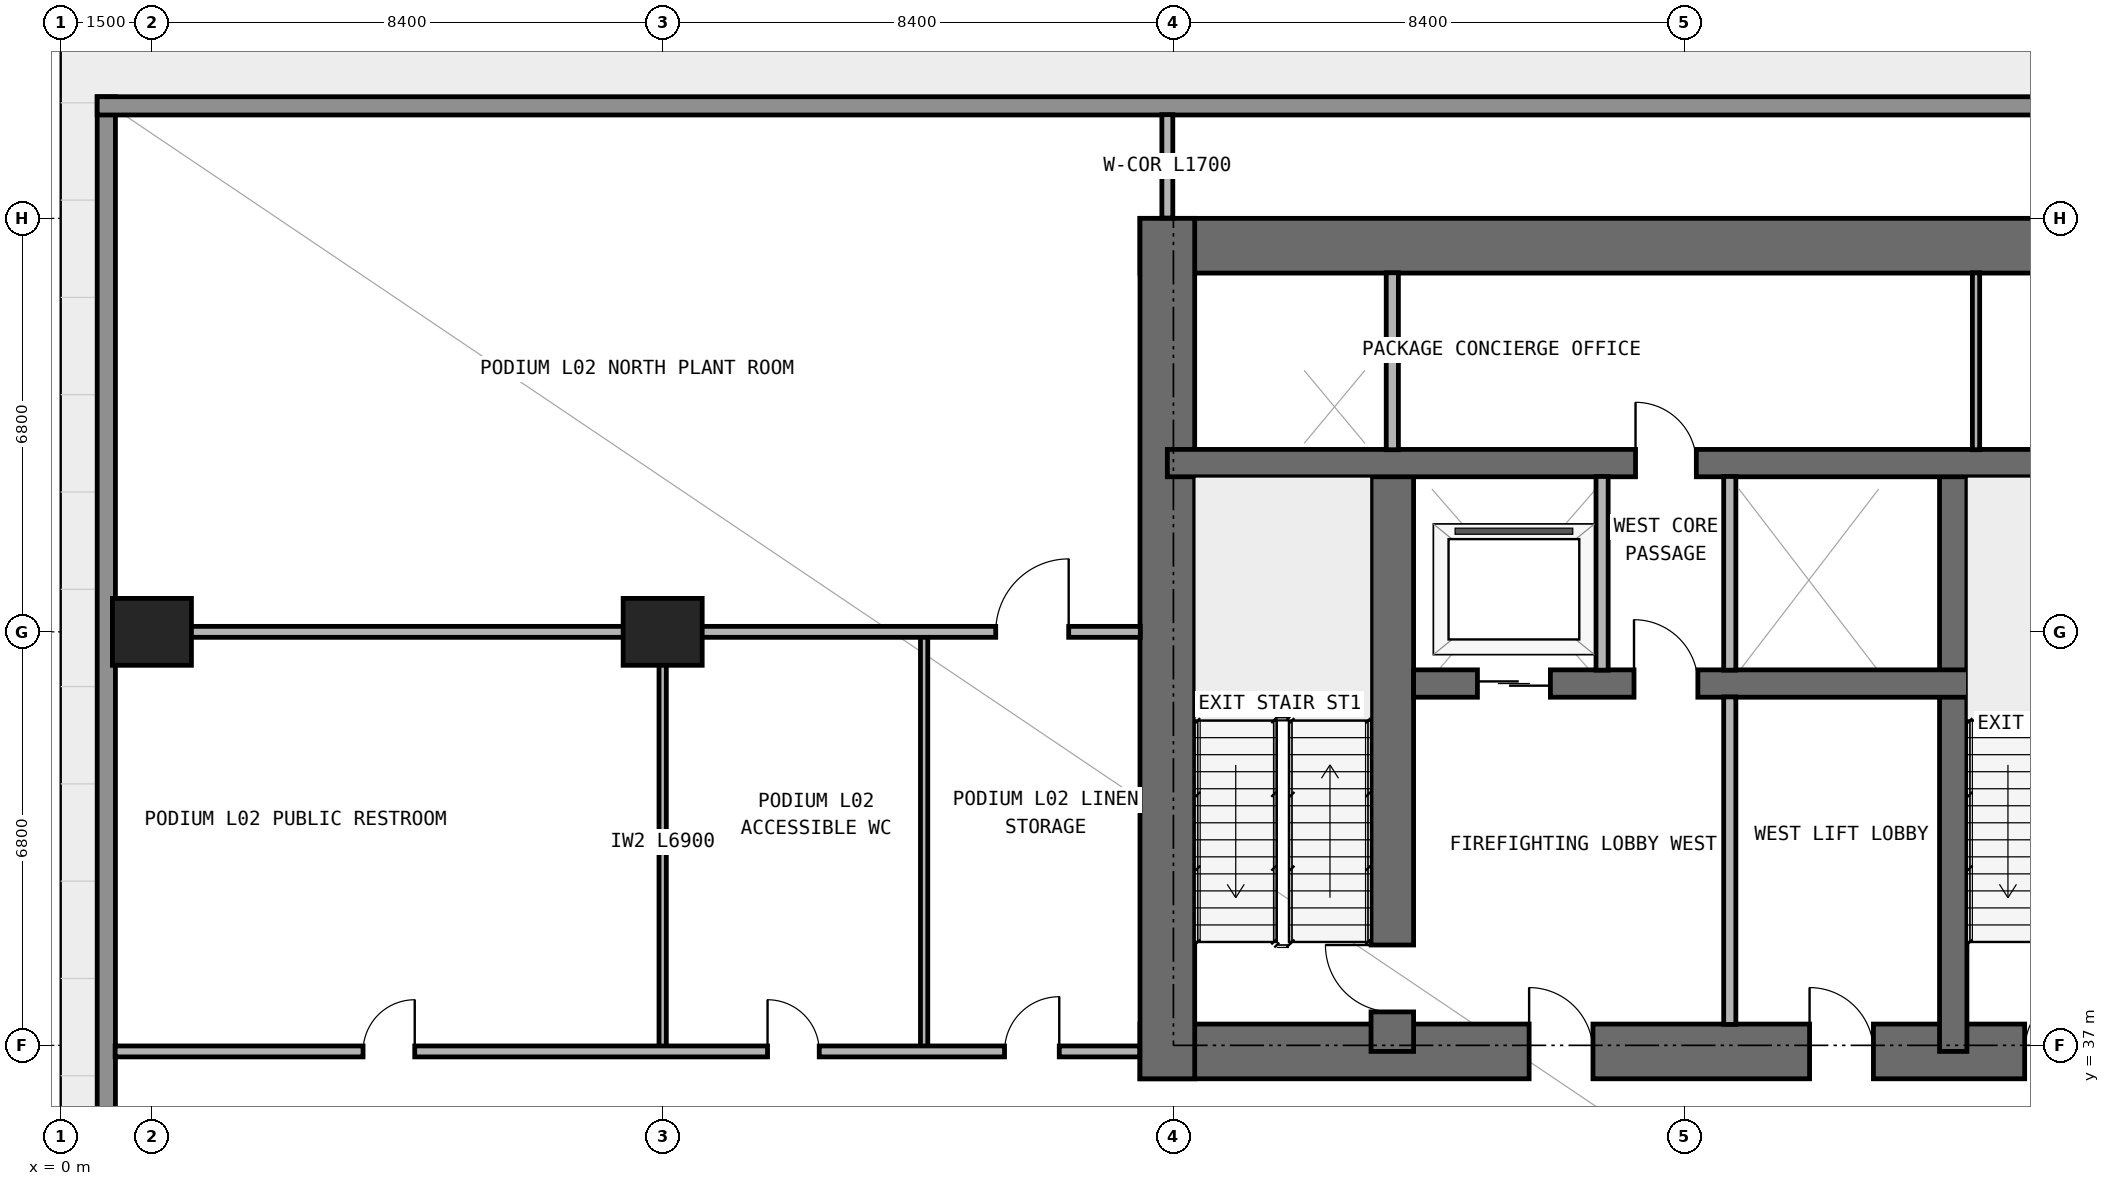
"""IFC4 building model, lengths in metres.
Left out: names, types, materials, properties, quantities, classifications, styles, units other than length and angle.
Written with IfcOpenShell. Run it as: python <this file> out.ifc"""

import sys

from ifc_helpers import new_model, si_unit, direction, frame, frame_2d, origin, origin_2d, place, context, subcontext, project, spatial, rectangle, extrude, element, fill, save


model = new_model("IFC4")
c1 = context("Model", 3, precision=1e-05, world=origin(), true_north=direction((0.0, 1.0)))
c2 = subcontext(c1, "Body", "Model", "MODEL_VIEW")
j1 = project(units=[si_unit("LENGTHUNIT", "METRE"), si_unit("PLANEANGLEUNIT", "RADIAN")], contexts=[c1])
p1 = place(None, origin())
s1 = spatial("IfcSite", under=j1, at=p1, CompositionType="ELEMENT")
p2 = place(p1, origin())
s2 = spatial("IfcBuilding", under=s1, at=p2, CompositionType="ELEMENT")
p3 = place(p2, frame((0.0, 0.0, 10.2)))
s3 = spatial("IfcBuildingStorey", under=s2, at=p3, CompositionType="ELEMENT", Elevation=10.2)
for number, where, z_axis, x_axis in (
    (1, (1.5, 43.8, 0.0), (0.0, 0.0, 1.0), (1.0, 0.0, 0.0)),
    (2, (9.9, 43.8, 0.0), (0.0, 0.0, 1.0), (1.0, 0.0, 0.0)),
):
    element("IfcColumn", number, at=place(p3, frame(where, z_axis=z_axis, x_axis=x_axis)), inside=s3, PredefinedType="COLUMN", context=c2, shape_type="SweptSolid", body=[
        extrude(rectangle(XDim=1.3, YDim=1.1, at=origin_2d()), origin(), (0.0, 0.0, 1.0), 4.5),
    ])
p4 = place(p3, frame((17.75, 36.9, 0.0), z_axis=(0.0, 0.0, 1.0), x_axis=(1.0, 0.0, 0.0)))
e3 = element("IfcWall", 3, at=p4, inside=s3, PredefinedType="SHEAR", context=c2, shape_type="SweptSolid", body=[
    extrude(rectangle(XDim=42.3, YDim=0.9, at=frame_2d((21.15, 0.0))), origin(), (0.0, 0.0, 1.0), 4.5),
])
p5 = place(p4, frame((14.55, 0.0, 0.0)))
e4 = element("IfcOpeningElement", 4, at=p5, cuts=e3, PredefinedType="OPENING", context=c2, shape_type="SweptSolid", body=[
    extrude(rectangle(XDim=1.1, YDim=2.15, at=frame_2d((0.55, 1.075))), frame((0.0, 0.46, 0.0), z_axis=(0.0, -1.0, 0.0), x_axis=(1.0, 0.0, 0.0)), (0.0, 0.0, 1.0), 0.92),
])
p6 = place(p4, frame((6.4, 0.0, 0.0)))
e5 = element("IfcOpeningElement", 5, at=p6, cuts=e3, PredefinedType="OPENING", context=c2, shape_type="SweptSolid", body=[
    extrude(rectangle(XDim=1.05, YDim=2.15, at=frame_2d((0.525, 1.075))), frame((0.0, 0.46, 0.0), z_axis=(0.0, -1.0, 0.0), x_axis=(1.0, 0.0, 0.0)), (0.0, 0.0, 1.0), 0.92),
])
p7 = place(p4, frame((34.9, 0.0, 0.0)))
e6 = element("IfcOpeningElement", 6, at=p7, cuts=e3, PredefinedType="OPENING", context=c2, shape_type="SweptSolid", body=[
    extrude(rectangle(XDim=1.05, YDim=2.15, at=frame_2d((0.525, 1.075))), frame((0.0, 0.46, 0.0), z_axis=(0.0, -1.0, 0.0), x_axis=(1.0, 0.0, 0.0)), (0.0, 0.0, 1.0), 0.92),
])
p8 = place(p4, frame((11.012, 0.0, 0.0)))
e7 = element("IfcOpeningElement", 7, at=p8, cuts=e3, PredefinedType="OPENING", context=c2, shape_type="SweptSolid", body=[
    extrude(rectangle(XDim=1.05, YDim=2.15, at=frame_2d((0.525, 1.075))), frame((0.0, 0.46, 0.0), z_axis=(0.0, -1.0, 0.0), x_axis=(1.0, 0.0, 0.0)), (0.0, 0.0, 1.0), 0.92),
])
p9 = place(p4, frame((24.25, 0.0, 0.0)))
e8 = element("IfcOpeningElement", 8, at=p9, cuts=e3, PredefinedType="OPENING", context=c2, shape_type="SweptSolid", body=[
    extrude(rectangle(XDim=1.05, YDim=2.15, at=frame_2d((0.525, 1.075))), frame((0.0, 0.46, 0.0), z_axis=(0.0, -1.0, 0.0), x_axis=(1.0, 0.0, 0.0)), (0.0, 0.0, 1.0), 0.92),
])
p10 = place(p3, frame((17.75, 50.15, 0.0), z_axis=(0.0, 0.0, 1.0), x_axis=(1.0, 0.0, 0.0)))
e9 = element("IfcWall", 9, at=p10, inside=s3, PredefinedType="SHEAR", context=c2, shape_type="SweptSolid", body=[
    extrude(rectangle(XDim=42.3, YDim=0.9, at=frame_2d((21.15, 0.0))), origin(), (0.0, 0.0, 1.0), 4.5),
])
p11 = place(p3, frame((18.2, 36.45, 0.0), z_axis=(0.0, 0.0, 1.0), x_axis=(0.0, 1.0, 0.0)))
e10 = element("IfcWall", 10, at=p11, inside=s3, PredefinedType="SHEAR", context=c2, shape_type="SweptSolid", body=[
    extrude(rectangle(XDim=14.15, YDim=0.9, at=frame_2d((7.075, 0.0))), origin(), (0.0, 0.0, 1.0), 4.5),
])
p12 = place(p3, frame((21.9, 36.9, 0.0), z_axis=(0.0, 0.0, 1.0), x_axis=(0.0, 1.0, 0.0)))
e11 = element("IfcWall", 11, at=p12, inside=s3, PredefinedType="SHEAR", context=c2, shape_type="SweptSolid", body=[
    extrude(rectangle(XDim=9.675, YDim=0.7, at=frame_2d((4.837, 0.0))), origin(), (0.0, 0.0, 1.0), 4.5),
])
p13 = place(p12, frame((0.65, 0.0, 0.0)))
e12 = element("IfcOpeningElement", 12, at=p13, cuts=e11, PredefinedType="OPENING", context=c2, shape_type="SweptSolid", body=[
    extrude(rectangle(XDim=1.1, YDim=2.15, at=frame_2d((0.55, 1.075))), frame((0.0, 0.36, 0.0), z_axis=(0.0, -1.0, 0.0), x_axis=(1.0, 0.0, 0.0)), (0.0, 0.0, 1.0), 0.72),
])
p14 = place(p3, frame((31.125, 36.9, 0.0), z_axis=(0.0, 0.0, 1.0), x_axis=(0.0, 1.0, 0.0)))
e13 = element("IfcWall", 13, at=p14, inside=s3, PredefinedType="SHEAR", context=c2, shape_type="SweptSolid", body=[
    extrude(rectangle(XDim=9.675, YDim=0.45, at=frame_2d((4.837, 0.0))), origin(), (0.0, 0.0, 1.0), 4.5),
])
p15 = place(p3, frame((22.25, 42.95, 0.0), z_axis=(0.0, 0.0, 1.0), x_axis=(1.0, 0.0, 0.0)))
e14 = element("IfcWall", 14, at=p15, inside=s3, PredefinedType="SHEAR", context=c2, shape_type="SweptSolid", body=[
    extrude(rectangle(XDim=33.3, YDim=0.45, at=frame_2d((16.65, 0.0))), origin(), (0.0, 0.0, 1.0), 4.5),
])
p16 = place(p15, frame((1.05, 0.0, 0.0)))
e15 = element("IfcOpeningElement", 15, at=p16, cuts=e14, PredefinedType="OPENING", context=c2, shape_type="SweptSolid", body=[
    extrude(rectangle(XDim=1.2, YDim=2.2, at=frame_2d((0.6, 1.1))), frame((0.0, 0.235, 0.0), z_axis=(0.0, -1.0, 0.0), x_axis=(1.0, 0.0, 0.0)), (0.0, 0.0, 1.0), 0.47),
])
p17 = place(p15, frame((31.05, 0.0, 0.0)))
e16 = element("IfcOpeningElement", 16, at=p17, cuts=e14, PredefinedType="OPENING", context=c2, shape_type="SweptSolid", body=[
    extrude(rectangle(XDim=1.2, YDim=2.2, at=frame_2d((0.6, 1.1))), frame((0.0, 0.235, 0.0), z_axis=(0.0, -1.0, 0.0), x_axis=(1.0, 0.0, 0.0)), (0.0, 0.0, 1.0), 0.47),
])
p18 = place(p15, frame((13.5, 0.0, 0.0)))
e17 = element("IfcOpeningElement", 17, at=p18, cuts=e14, PredefinedType="OPENING", context=c2, shape_type="SweptSolid", body=[
    extrude(rectangle(XDim=1.1, YDim=2.2, at=frame_2d((0.55, 1.1))), frame((0.0, 0.235, 0.0), z_axis=(0.0, -1.0, 0.0), x_axis=(1.0, 0.0, 0.0)), (0.0, 0.0, 1.0), 0.47),
])
p19 = place(p15, frame((16.1, 0.0, 0.0)))
e18 = element("IfcOpeningElement", 18, at=p19, cuts=e14, PredefinedType="OPENING", context=c2, shape_type="SweptSolid", body=[
    extrude(rectangle(XDim=1.1, YDim=2.2, at=frame_2d((0.55, 1.1))), frame((0.0, 0.235, 0.0), z_axis=(0.0, -1.0, 0.0), x_axis=(1.0, 0.0, 0.0)), (0.0, 0.0, 1.0), 0.47),
])
p20 = place(p15, frame((18.7, 0.0, 0.0)))
e19 = element("IfcOpeningElement", 19, at=p20, cuts=e14, PredefinedType="OPENING", context=c2, shape_type="SweptSolid", body=[
    extrude(rectangle(XDim=1.1, YDim=2.2, at=frame_2d((0.55, 1.1))), frame((0.0, 0.235, 0.0), z_axis=(0.0, -1.0, 0.0), x_axis=(1.0, 0.0, 0.0)), (0.0, 0.0, 1.0), 0.47),
])
p21 = place(p15, frame((3.625, 0.0, 0.0)))
e20 = element("IfcOpeningElement", 20, at=p21, cuts=e14, PredefinedType="OPENING", context=c2, shape_type="SweptSolid", body=[
    extrude(rectangle(XDim=1.05, YDim=2.15, at=frame_2d((0.525, 1.075))), frame((0.0, 0.235, 0.0), z_axis=(0.0, -1.0, 0.0), x_axis=(1.0, 0.0, 0.0)), (0.0, 0.0, 1.0), 0.47),
])
p22 = place(p15, frame((28.675, 0.0, 0.0)))
e21 = element("IfcOpeningElement", 21, at=p22, cuts=e14, PredefinedType="OPENING", context=c2, shape_type="SweptSolid", body=[
    extrude(rectangle(XDim=1.05, YDim=2.15, at=frame_2d((0.525, 1.075))), frame((0.0, 0.235, 0.0), z_axis=(0.0, -1.0, 0.0), x_axis=(1.0, 0.0, 0.0)), (0.0, 0.0, 1.0), 0.47),
])
p23 = place(p3, frame((18.2, 46.575, 0.0), z_axis=(0.0, 0.0, 1.0), x_axis=(1.0, 0.0, 0.0)))
e22 = element("IfcWall", 22, at=p23, inside=s3, PredefinedType="SHEAR", context=c2, shape_type="SweptSolid", body=[
    extrude(rectangle(XDim=41.4, YDim=0.45, at=frame_2d((20.7, 0.0))), origin(), (0.0, 0.0, 1.0), 4.5),
])
p24 = place(p23, frame((7.7, 0.0, 0.0)))
e23 = element("IfcOpeningElement", 23, at=p24, cuts=e22, PredefinedType="OPENING", context=c2, shape_type="SweptSolid", body=[
    extrude(rectangle(XDim=1.0, YDim=2.2, at=frame_2d((0.5, 1.1))), frame((0.0, 0.235, 0.0), z_axis=(0.0, -1.0, 0.0), x_axis=(1.0, 0.0, 0.0)), (0.0, 0.0, 1.0), 0.47),
])
p25 = place(p23, frame((32.725, 0.0, 0.0)))
e24 = element("IfcOpeningElement", 24, at=p25, cuts=e22, PredefinedType="OPENING", context=c2, shape_type="SweptSolid", body=[
    extrude(rectangle(XDim=1.05, YDim=2.15, at=frame_2d((0.525, 1.075))), frame((0.0, 0.235, 0.0), z_axis=(0.0, -1.0, 0.0), x_axis=(1.0, 0.0, 0.0)), (0.0, 0.0, 1.0), 0.47),
])
p26 = place(p3, frame((0.75, 26.8, 0.0), z_axis=(0.0, 0.0, 1.0), x_axis=(0.0, 1.0, 0.0)))
e25 = element("IfcWall", 25, at=p26, inside=s3, PredefinedType="STANDARD", context=c2, shape_type="SweptSolid", body=[
    extrude(rectangle(XDim=25.8, YDim=0.3, at=frame_2d((12.9, 0.0))), origin(), (0.0, 0.0, 1.0), 4.5),
])
p27 = place(p3, frame((0.6, 52.45, 0.0), z_axis=(0.0, 0.0, 1.0), x_axis=(1.0, 0.0, 0.0)))
e26 = element("IfcWall", 26, at=p27, inside=s3, PredefinedType="STANDARD", context=c2, shape_type="SweptSolid", body=[
    extrude(rectangle(XDim=76.6, YDim=0.3, at=frame_2d((38.3, 0.0))), origin(), (0.0, 0.0, 1.0), 4.5),
])
p28 = place(p3, frame((9.9, 36.9, 0.0), z_axis=(0.0, 0.0, 1.0), x_axis=(0.0, 1.0, 0.0)))
e27 = element("IfcWall", 27, at=p28, inside=s3, PredefinedType="PARTITIONING", context=c2, shape_type="SweptSolid", body=[
    extrude(rectangle(XDim=6.9, YDim=0.12, at=frame_2d((3.45, 0.0))), origin(), (0.0, 0.0, 1.0), 3.464),
])
p29 = place(p3, frame((14.2, 36.9, 0.0), z_axis=(0.0, 0.0, 1.0), x_axis=(0.0, 1.0, 0.0)))
e28 = element("IfcWall", 28, at=p29, inside=s3, PredefinedType="PARTITIONING", context=c2, shape_type="SweptSolid", body=[
    extrude(rectangle(XDim=6.9, YDim=0.12, at=frame_2d((3.45, 0.0))), origin(), (0.0, 0.0, 1.0), 4.5),
])
p30 = place(p3, frame((18.2, 50.605, 0.0), z_axis=(0.0, 0.0, 1.0), x_axis=(0.0, 1.0, 0.0)))
e29 = element("IfcWall", 29, at=p30, inside=s3, PredefinedType="PARTITIONING", context=c2, shape_type="SweptSolid", body=[
    extrude(rectangle(XDim=1.7, YDim=0.18, at=frame_2d((0.85, 0.0))), origin(), (0.0, 0.0, 1.0), 4.5),
])
p31 = place(p3, frame((21.9, 46.795, 0.0), z_axis=(0.0, 0.0, 1.0), x_axis=(0.0, 1.0, 0.0)))
e30 = element("IfcWall", 30, at=p31, inside=s3, PredefinedType="PARTITIONING", context=c2, shape_type="SweptSolid", body=[
    extrude(rectangle(XDim=2.91, YDim=0.2, at=frame_2d((1.455, 0.0))), origin(), (0.0, 0.0, 1.0), 4.5),
])
p32 = place(p3, frame((25.35, 43.17, 0.0), z_axis=(0.0, 0.0, 1.0), x_axis=(0.0, 1.0, 0.0)))
e31 = element("IfcWall", 31, at=p32, inside=s3, PredefinedType="PARTITIONING", context=c2, shape_type="SweptSolid", body=[
    extrude(rectangle(XDim=3.185, YDim=0.2, at=frame_2d((1.593, 0.0))), origin(), (0.0, 0.0, 1.0), 4.5),
])
p33 = place(p3, frame((27.45, 37.345, 0.0), z_axis=(0.0, 0.0, 1.0), x_axis=(0.0, 1.0, 0.0)))
e32 = element("IfcWall", 32, at=p33, inside=s3, PredefinedType="PARTITIONING", context=c2, shape_type="SweptSolid", body=[
    extrude(rectangle(XDim=5.385, YDim=0.2, at=frame_2d((2.692, 0.0))), origin(), (0.0, 0.0, 1.0), 4.5),
])
p34 = place(p3, frame((27.45, 43.17, 0.0), z_axis=(0.0, 0.0, 1.0), x_axis=(0.0, 1.0, 0.0)))
e33 = element("IfcWall", 33, at=p34, inside=s3, PredefinedType="PARTITIONING", context=c2, shape_type="SweptSolid", body=[
    extrude(rectangle(XDim=3.185, YDim=0.2, at=frame_2d((1.593, 0.0))), origin(), (0.0, 0.0, 1.0), 4.5),
])
p35 = place(p3, frame((31.5, 46.795, 0.0), z_axis=(0.0, 0.0, 1.0), x_axis=(0.0, 1.0, 0.0)))
e34 = element("IfcWall", 34, at=p35, inside=s3, PredefinedType="PARTITIONING", context=c2, shape_type="SweptSolid", body=[
    extrude(rectangle(XDim=2.91, YDim=0.12, at=frame_2d((1.455, 0.0))), origin(), (0.0, 0.0, 1.0), 4.5),
])
p36 = place(p3, frame((0.895, 36.9, 0.0), z_axis=(0.0, 0.0, 1.0), x_axis=(1.0, 0.0, 0.0)))
e35 = element("IfcWall", 35, at=p36, inside=s3, PredefinedType="PARTITIONING", context=c2, shape_type="SweptSolid", body=[
    extrude(rectangle(XDim=16.85, YDim=0.18, at=frame_2d((8.425, 0.0))), origin(), (0.0, 0.0, 1.0), 4.5),
])
p37 = place(p36, frame((4.077, 0.0, 0.0)))
e36 = element("IfcOpeningElement", 36, at=p37, cuts=e35, PredefinedType="OPENING", context=c2, shape_type="SweptSolid", body=[
    extrude(rectangle(XDim=0.85, YDim=2.1, at=frame_2d((0.425, 1.05))), frame((0.0, 0.1, 0.0), z_axis=(0.0, -1.0, 0.0), x_axis=(1.0, 0.0, 0.0)), (0.0, 0.0, 1.0), 0.2),
])
p38 = place(p36, frame((10.73, 0.0, 0.0)))
e37 = element("IfcOpeningElement", 37, at=p38, cuts=e35, PredefinedType="OPENING", context=c2, shape_type="SweptSolid", body=[
    extrude(rectangle(XDim=0.85, YDim=2.1, at=frame_2d((0.425, 1.05))), frame((0.0, 0.1, 0.0), z_axis=(0.0, -1.0, 0.0), x_axis=(1.0, 0.0, 0.0)), (0.0, 0.0, 1.0), 0.2),
])
p39 = place(p36, frame((14.627, 0.0, 0.0)))
e38 = element("IfcOpeningElement", 38, at=p39, cuts=e35, PredefinedType="OPENING", context=c2, shape_type="SweptSolid", body=[
    extrude(rectangle(XDim=0.9, YDim=2.15, at=frame_2d((0.45, 1.075))), frame((0.0, 0.1, 0.0), z_axis=(0.0, -1.0, 0.0), x_axis=(1.0, 0.0, 0.0)), (0.0, 0.0, 1.0), 0.2),
])
p40 = place(p3, frame((0.895, 43.8, 0.0), z_axis=(0.0, 0.0, 1.0), x_axis=(1.0, 0.0, 0.0)))
e39 = element("IfcWall", 39, at=p40, inside=s3, PredefinedType="PARTITIONING", context=c2, shape_type="SweptSolid", body=[
    extrude(rectangle(XDim=16.86, YDim=0.18, at=frame_2d((8.43, 0.0))), origin(), (0.0, 0.0, 1.0), 3.789),
])
p41 = place(p40, frame((14.482, 0.0, 0.0)))
e40 = element("IfcOpeningElement", 40, at=p41, cuts=e39, PredefinedType="OPENING", context=c2, shape_type="SweptSolid", body=[
    extrude(rectangle(XDim=1.2, YDim=2.2, at=frame_2d((0.6, 1.1))), frame((0.0, 0.1, 0.0), z_axis=(0.0, -1.0, 0.0), x_axis=(1.0, 0.0, 0.0)), (0.0, 0.0, 1.0), 0.2),
])
p42 = place(p16, origin())
e41 = element("IfcDoor", 41, at=p42, inside=s3, OperationType="DOUBLE_DOOR_SLIDING", PredefinedType="DOOR", context=c2, shape_type="SweptSolid", body=[
    extrude(rectangle(XDim=1.2, YDim=2.2, at=frame_2d((0.6, 1.1))), frame((0.0, 0.025, 0.0), z_axis=(0.0, -1.0, 0.0), x_axis=(1.0, 0.0, 0.0)), (0.0, 0.0, 1.0), 0.05),
])
fill(e15, e41)
p43 = place(p5, origin())
e42 = element("IfcDoor", 42, at=p43, inside=s3, OperationType="SINGLE_SWING_RIGHT", PredefinedType="DOOR", context=c2, shape_type="SweptSolid", body=[
    extrude(rectangle(XDim=1.1, YDim=2.15, at=frame_2d((0.55, 1.075))), frame((0.0, 0.025, 0.0), z_axis=(0.0, -1.0, 0.0), x_axis=(1.0, 0.0, 0.0)), (0.0, 0.0, 1.0), 0.05),
])
fill(e4, e42)
p44 = place(p6, origin())
e43 = element("IfcDoor", 43, at=p44, inside=s3, OperationType="SINGLE_SWING_LEFT", PredefinedType="DOOR", context=c2, shape_type="SweptSolid", body=[
    extrude(rectangle(XDim=1.05, YDim=2.15, at=frame_2d((0.525, 1.075))), frame((0.0, 0.025, 0.0), z_axis=(0.0, -1.0, 0.0), x_axis=(1.0, 0.0, 0.0)), (0.0, 0.0, 1.0), 0.05),
])
fill(e5, e43)
p45 = place(p13, origin())
e44 = element("IfcDoor", 44, at=p45, inside=s3, OperationType="SINGLE_SWING_RIGHT", PredefinedType="DOOR", context=c2, shape_type="SweptSolid", body=[
    extrude(rectangle(XDim=1.1, YDim=2.15, at=frame_2d((0.55, 1.075))), frame((0.0, 0.025, 0.0), z_axis=(0.0, -1.0, 0.0), x_axis=(1.0, 0.0, 0.0)), (0.0, 0.0, 1.0), 0.05),
])
fill(e12, e44)
p46 = place(p21, origin())
e45 = element("IfcDoor", 45, at=p46, inside=s3, OperationType="SINGLE_SWING_LEFT", PredefinedType="DOOR", context=c2, shape_type="SweptSolid", body=[
    extrude(rectangle(XDim=1.05, YDim=2.15, at=frame_2d((0.525, 1.075))), frame((0.0, 0.025, 0.0), z_axis=(0.0, -1.0, 0.0), x_axis=(1.0, 0.0, 0.0)), (0.0, 0.0, 1.0), 0.05),
])
fill(e20, e45)
p47 = place(p8, origin())
e46 = element("IfcDoor", 46, at=p47, inside=s3, OperationType="SINGLE_SWING_LEFT", PredefinedType="DOOR", context=c2, shape_type="SweptSolid", body=[
    extrude(rectangle(XDim=1.05, YDim=2.15, at=frame_2d((0.525, 1.075))), frame((0.0, 0.025, 0.0), z_axis=(0.0, -1.0, 0.0), x_axis=(1.0, 0.0, 0.0)), (0.0, 0.0, 1.0), 0.05),
])
fill(e7, e46)
p48 = place(p24, origin())
e47 = element("IfcDoor", 47, at=p48, inside=s3, OperationType="SINGLE_SWING_LEFT", PredefinedType="DOOR", context=c2, shape_type="SweptSolid", body=[
    extrude(rectangle(XDim=1.0, YDim=2.2, at=frame_2d((0.5, 1.1))), frame((0.0, 0.025, 0.0), z_axis=(0.0, -1.0, 0.0), x_axis=(1.0, 0.0, 0.0)), (0.0, 0.0, 1.0), 0.05),
])
fill(e23, e47)
p49 = place(p37, origin())
e48 = element("IfcDoor", 48, at=p49, inside=s3, OperationType="SINGLE_SWING_RIGHT", PredefinedType="DOOR", context=c2, shape_type="SweptSolid", body=[
    extrude(rectangle(XDim=0.85, YDim=2.1, at=frame_2d((0.425, 1.05))), frame((0.0, 0.025, 0.0), z_axis=(0.0, -1.0, 0.0), x_axis=(1.0, 0.0, 0.0)), (0.0, 0.0, 1.0), 0.05),
])
fill(e36, e48)
p50 = place(p38, origin())
e49 = element("IfcDoor", 49, at=p50, inside=s3, OperationType="SINGLE_SWING_LEFT", PredefinedType="DOOR", context=c2, shape_type="SweptSolid", body=[
    extrude(rectangle(XDim=0.85, YDim=2.1, at=frame_2d((0.425, 1.05))), frame((0.0, 0.025, 0.0), z_axis=(0.0, -1.0, 0.0), x_axis=(1.0, 0.0, 0.0)), (0.0, 0.0, 1.0), 0.05),
])
fill(e37, e49)
p51 = place(p39, origin())
e50 = element("IfcDoor", 50, at=p51, inside=s3, OperationType="SINGLE_SWING_RIGHT", PredefinedType="DOOR", context=c2, shape_type="SweptSolid", body=[
    extrude(rectangle(XDim=0.9, YDim=2.15, at=frame_2d((0.45, 1.075))), frame((0.0, 0.025, 0.0), z_axis=(0.0, -1.0, 0.0), x_axis=(1.0, 0.0, 0.0)), (0.0, 0.0, 1.0), 0.05),
])
fill(e38, e50)
p52 = place(p41, origin())
e51 = element("IfcDoor", 51, at=p52, inside=s3, OperationType="SINGLE_SWING_RIGHT", PredefinedType="DOOR", context=c2, shape_type="SweptSolid", body=[
    extrude(rectangle(XDim=1.2, YDim=2.2, at=frame_2d((0.6, 1.1))), frame((0.0, 0.025, 0.0), z_axis=(0.0, -1.0, 0.0), x_axis=(1.0, 0.0, 0.0)), (0.0, 0.0, 1.0), 0.05),
])
fill(e40, e51)
save(model, sys.argv[1])
